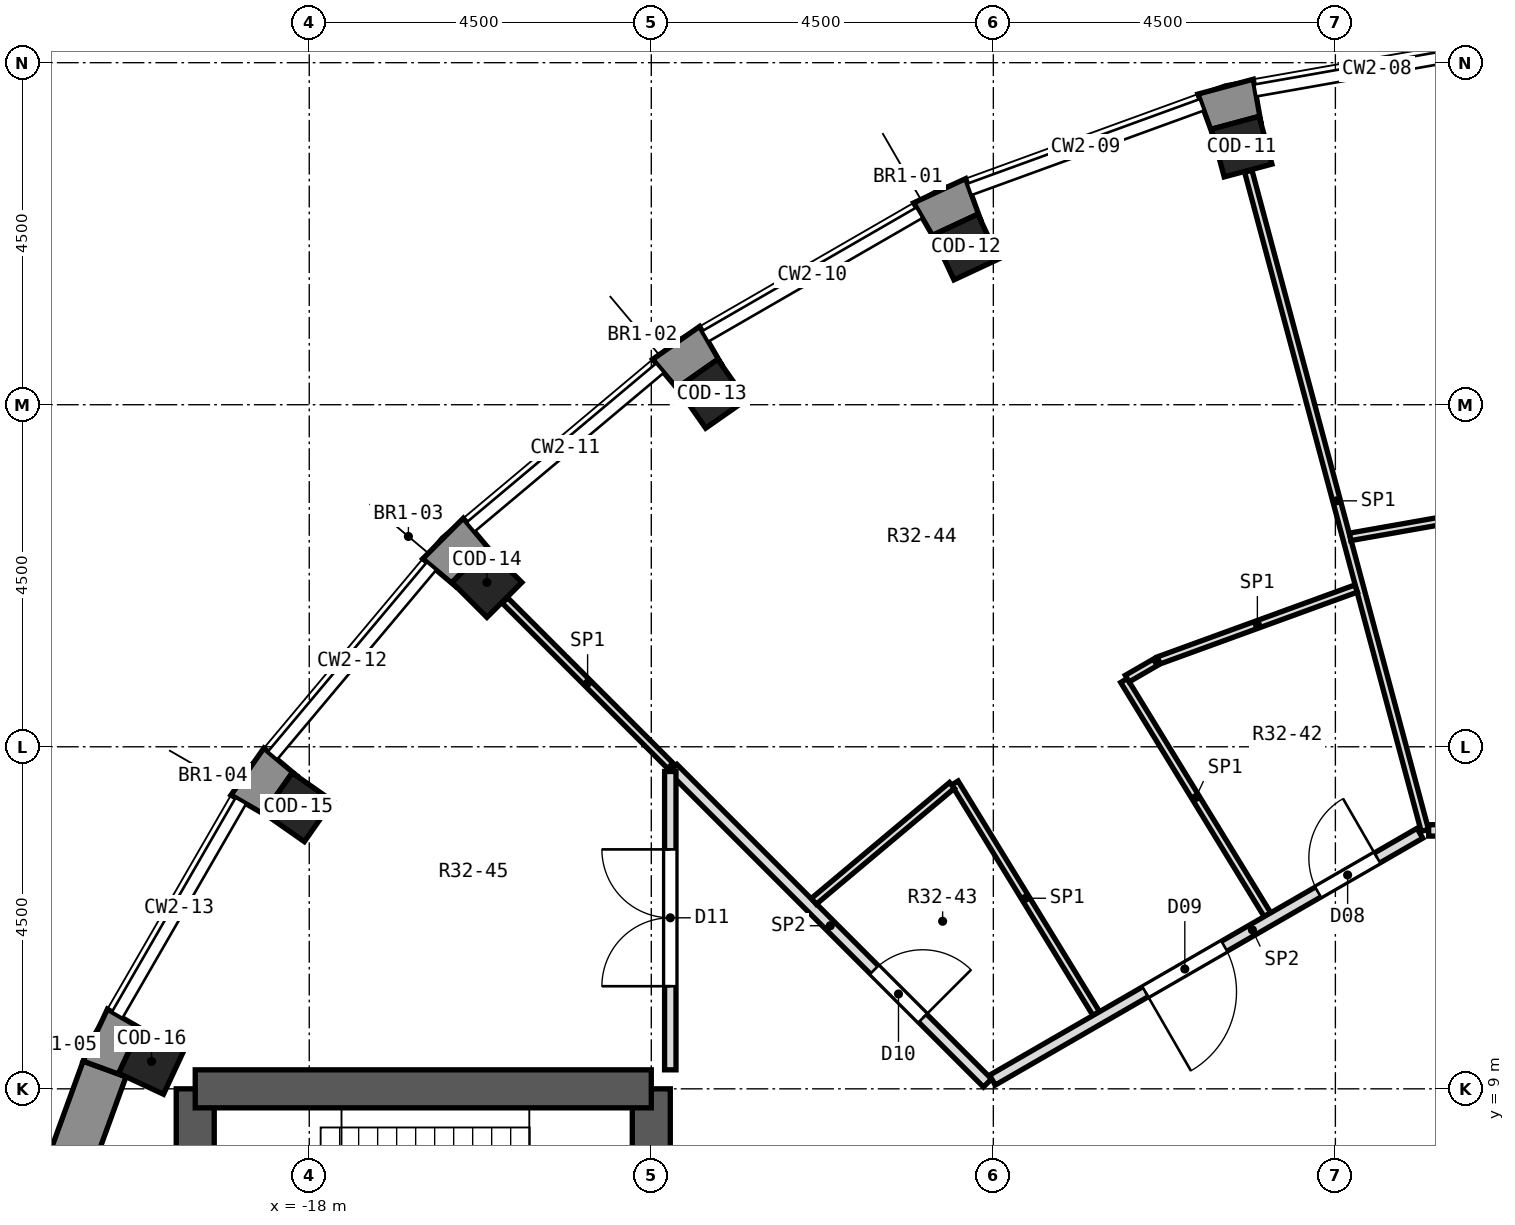
"""IFC4 building model, lengths in metres.
Left out: names, types, materials, properties, quantities, classifications, styles, units other than length and angle.
Written with IfcOpenShell. Run it as: python <this file> out.ifc"""

import sys

from ifc_helpers import new_model, si_unit, direction, frame, frame_2d, origin, origin_2d, place, context, subcontext, project, spatial, polyline, rectangle, outline, extrude, element, fill, save


model = new_model("IFC4")
c1 = context("Model", 3, precision=1e-05, world=origin(), true_north=direction((0.0, 1.0)))
c2 = subcontext(c1, "Body", "Model", "MODEL_VIEW")
j1 = project(units=[si_unit("LENGTHUNIT", "METRE"), si_unit("PLANEANGLEUNIT", "RADIAN")], contexts=[c1])
p1 = place(None, origin())
s1 = spatial("IfcSite", under=j1, at=p1, CompositionType="ELEMENT")
p2 = place(p1, origin())
s2 = spatial("IfcBuilding", under=s1, at=p2, CompositionType="ELEMENT")
p3 = place(p2, frame((0.0, 0.0, 224.7)))
s3 = spatial("IfcBuildingStorey", under=s2, at=p3, CompositionType="ELEMENT", Elevation=224.7)
for number, where, z_axis, x_axis in (
    (1, (-5.733, 21.395, -0.55), (0.0, 0.0, 1.0), (-0.259, 0.966, 0.0)),
    (2, (-9.361, 20.075, -0.55), (0.0, 0.0, 1.0), (-0.423, 0.906, 0.0)),
    (3, (-12.705, 18.144, -0.55), (0.0, 0.0, 1.0), (-0.574, 0.819, 0.0)),
    (4, (-15.662, 15.662, -0.55), (0.0, 0.0, 1.0), (-0.707, 0.707, 0.0)),
    (5, (-18.144, 12.705, -0.55), (0.0, 0.0, 1.0), (-0.819, 0.574, 0.0)),
    (6, (-20.075, 9.361, -0.55), (0.0, 0.0, 1.0), (-0.906, 0.423, 0.0)),
):
    element("IfcColumn", number, at=place(p3, frame(where, z_axis=z_axis, x_axis=x_axis)), inside=s3, PredefinedType="COLUMN", context=c2, shape_type="SweptSolid", body=[
        extrude(rectangle(XDim=0.65, YDim=0.65, at=origin_2d()), origin(), (0.0, 0.0, 1.0), 5.55),
    ])
p4 = place(p3, frame((-13.5, -9.0, 0.0), z_axis=(0.0, 0.0, 1.0), x_axis=(0.0, 1.0, 0.0)))
e7 = element("IfcWall", 7, at=p4, inside=s3, PredefinedType="SHEAR", context=c2, shape_type="SweptSolid", body=[
    extrude(rectangle(XDim=18.0, YDim=0.5, at=frame_2d((9.0, 0.0))), origin(), (0.0, 0.0, 1.0), 5.0),
])
p5 = place(p4, frame((15.4, 0.0, 0.0)))
e8 = element("IfcOpeningElement", 8, at=p5, cuts=e7, PredefinedType="OPENING", context=c2, shape_type="SweptSolid", body=[
    extrude(rectangle(XDim=1.2, YDim=2.1, at=frame_2d((0.6, 1.05))), frame((0.0, 0.262, 0.0), z_axis=(0.0, -1.0, 0.0), x_axis=(1.0, 0.0, 0.0)), (0.0, 0.0, 1.0), 0.524),
])
p6 = place(p4, frame((1.4, 0.0, 0.0)))
e9 = element("IfcOpeningElement", 9, at=p6, cuts=e7, PredefinedType="OPENING", context=c2, shape_type="SweptSolid", body=[
    extrude(rectangle(XDim=1.2, YDim=2.1, at=frame_2d((0.6, 1.05))), frame((0.0, 0.262, 0.0), z_axis=(0.0, -1.0, 0.0), x_axis=(1.0, 0.0, 0.0)), (0.0, 0.0, 1.0), 0.524),
])
p7 = place(p4, frame((7.5, 0.0, 0.0)))
e10 = element("IfcOpeningElement", 10, at=p7, cuts=e7, PredefinedType="OPENING", context=c2, shape_type="SweptSolid", body=[
    extrude(rectangle(XDim=3.0, YDim=2.4, at=frame_2d((1.5, 1.2))), frame((0.0, 0.262, 0.0), z_axis=(0.0, -1.0, 0.0), x_axis=(1.0, 0.0, 0.0)), (0.0, 0.0, 1.0), 0.524),
])
p8 = place(p3, frame((-19.5, -9.0, 0.0), z_axis=(0.0, 0.0, 1.0), x_axis=(0.0, 1.0, 0.0)))
e11 = element("IfcWall", 11, at=p8, inside=s3, PredefinedType="SHEAR", context=c2, shape_type="SweptSolid", body=[
    extrude(rectangle(XDim=18.0, YDim=0.5, at=frame_2d((9.0, 0.0))), origin(), (0.0, 0.0, 1.0), 5.0),
])
p9 = place(p8, frame((9.45, 0.0, 0.0)))
e12 = element("IfcOpeningElement", 12, at=p9, cuts=e11, PredefinedType="OPENING", context=c2, shape_type="SweptSolid", body=[
    extrude(rectangle(XDim=0.9, YDim=2.1, at=frame_2d((0.45, 1.05))), frame((0.0, 0.262, 0.0), z_axis=(0.0, -1.0, 0.0), x_axis=(1.0, 0.0, 0.0)), (0.0, 0.0, 1.0), 0.524),
])
p10 = place(p8, frame((7.65, 0.0, 0.0)))
e13 = element("IfcOpeningElement", 13, at=p10, cuts=e11, PredefinedType="OPENING", context=c2, shape_type="SweptSolid", body=[
    extrude(rectangle(XDim=0.9, YDim=2.1, at=frame_2d((0.45, 1.05))), frame((0.0, 0.262, 0.0), z_axis=(0.0, -1.0, 0.0), x_axis=(1.0, 0.0, 0.0)), (0.0, 0.0, 1.0), 0.524),
])
p11 = place(p3, frame((-13.5, 9.0, 0.0), z_axis=(0.0, 0.0, 1.0), x_axis=(-1.0, 0.0, 0.0)))
e14 = element("IfcWall", 14, at=p11, inside=s3, PredefinedType="SHEAR", context=c2, shape_type="SweptSolid", body=[
    extrude(rectangle(XDim=6.0, YDim=0.5, at=frame_2d((3.0, 0.0))), origin(), (0.0, 0.0, 1.0), 5.0),
])
p12 = place(p3, frame((-20.693, 9.262, 0.0), z_axis=(0.0, 0.0, 1.0), x_axis=(-0.342056509473, -0.939679383794, 0.0)))
e15 = element("IfcWall", 15, at=p12, inside=s3, PredefinedType="SOLIDWALL", context=c2, shape_type="SweptSolid", body=[
    extrude(rectangle(XDim=3.252, YDim=0.6, at=frame_2d((1.626, 0.0))), origin(), (0.0, 0.0, 1.0), 4.6),
])
p13 = place(p3, origin())
e16 = element("IfcWall", 16, at=p13, inside=s3, PredefinedType="SOLIDWALL", context=c2, shape_type="SweptSolid", body=[
    extrude(outline(polyline([(-6.309, 22.087), (-6.104, 21.523), (-6.131, 21.625), (-5.503, 21.793), (-5.476, 21.691), (-5.58, 22.282), (-6.309, 22.087)])), origin(), (0.0, 0.0, 1.0), 4.6),
])
p14 = place(p3, origin())
e17 = element("IfcWall", 17, at=p14, inside=s3, PredefinedType="SOLIDWALL", context=c2, shape_type="SweptSolid", body=[
    extrude(outline(polyline([(-9.364, 20.975), (-10.048, 20.656), (-9.748, 20.136), (-9.793, 20.232), (-9.204, 20.507), (-9.159, 20.411), (-9.364, 20.975)])), origin(), (0.0, 0.0, 1.0), 4.6),
])
p15 = place(p3, origin())
e18 = element("IfcWall", 18, at=p15, inside=s3, PredefinedType="SOLIDWALL", context=c2, shape_type="SweptSolid", body=[
    extrude(outline(polyline([(-12.864, 19.03), (-13.482, 18.597), (-13.097, 18.137), (-13.157, 18.224), (-12.625, 18.597), (-12.564, 18.51), (-12.864, 19.03)])), origin(), (0.0, 0.0, 1.0), 4.6),
])
p16 = place(p3, origin())
e19 = element("IfcWall", 19, at=p16, inside=s3, PredefinedType="SOLIDWALL", context=c2, shape_type="SweptSolid", body=[
    extrude(outline(polyline([(-16.507, 15.973), (-16.047, 15.588), (-16.122, 15.662), (-15.662, 16.122), (-15.588, 16.047), (-15.973, 16.507), (-16.507, 15.973)])), origin(), (0.0, 0.0, 1.0), 4.6),
])
p17 = place(p3, origin())
e20 = element("IfcWall", 20, at=p17, inside=s3, PredefinedType="SOLIDWALL", context=c2, shape_type="SweptSolid", body=[
    extrude(outline(polyline([(-19.03, 12.864), (-18.51, 12.564), (-18.597, 12.625), (-18.224, 13.157), (-18.137, 13.097), (-18.597, 13.482), (-19.03, 12.864)])), origin(), (0.0, 0.0, 1.0), 4.6),
])
p18 = place(p3, origin())
e21 = element("IfcWall", 21, at=p18, inside=s3, PredefinedType="SOLIDWALL", context=c2, shape_type="SweptSolid", body=[
    extrude(outline(polyline([(-20.656, 10.048), (-20.975, 9.364), (-20.411, 9.159), (-20.507, 9.204), (-20.232, 9.793), (-20.136, 9.748), (-20.656, 10.048)])), origin(), (0.0, 0.0, 1.0), 4.6),
])
p19 = place(p3, frame((-5.646, 21.072, 0.0), z_axis=(0.0, 0.0, 1.0), x_axis=(0.258728835498, -0.965949993365, 0.0)))
e22 = element("IfcWall", 22, at=p19, inside=s3, PredefinedType="PARTITIONING", context=c2, shape_type="SweptSolid", body=[
    extrude(rectangle(XDim=8.978, YDim=0.1, at=frame_2d((4.489, 0.0))), origin(), (0.0, 0.0, 1.0), 4.6),
])
p20 = place(p3, frame((-9.506, 13.024, 0.0), z_axis=(0.0, 0.0, 1.0), x_axis=(0.522634449586, -0.852556879103, 0.0)))
e23 = element("IfcWall", 23, at=p20, inside=s3, PredefinedType="PARTITIONING", context=c2, shape_type="SweptSolid", body=[
    extrude(rectangle(XDim=3.559, YDim=0.1, at=frame_2d((1.779, 0.0))), origin(), (0.0, 0.0, 1.0), 4.6),
])
p21 = place(p3, frame((-7.282, 14.372, 0.0), z_axis=(0.0, 0.0, 1.0), x_axis=(0.522422625175, -0.852686695513, 0.0)))
e24 = element("IfcWall", 24, at=p21, inside=s3, PredefinedType="PARTITIONING", context=c2, shape_type="SweptSolid", body=[
    extrude(rectangle(XDim=3.613, YDim=0.1, at=frame_2d((1.807, 0.0))), origin(), (0.0, 0.0, 1.0), 4.6),
])
p22 = place(p3, frame((-15.426, 15.426, 0.0), z_axis=(0.0, 0.0, 1.0), x_axis=(0.707106781187, -0.707106781187, 0.0)))
e25 = element("IfcWall", 25, at=p22, inside=s3, PredefinedType="PARTITIONING", context=c2, shape_type="SweptSolid", body=[
    extrude(rectangle(XDim=3.077, YDim=0.1, at=frame_2d((1.538, 0.0))), origin(), (0.0, 0.0, 1.0), 4.6),
])
p23 = place(p3, frame((-13.215, 13.215, 0.0), z_axis=(0.0, 0.0, 1.0), x_axis=(0.707106781187, -0.707106781187, 0.0)))
e26 = element("IfcWall", 26, at=p23, inside=s3, PredefinedType="PARTITIONING", context=c2, shape_type="SweptSolid", body=[
    extrude(rectangle(XDim=5.852, YDim=0.15, at=frame_2d((2.926, 0.0))), origin(), (0.0, 0.0, 1.0), 4.6),
])
p24 = place(p23, frame((3.746, 0.0, 0.0)))
e27 = element("IfcOpeningElement", 27, at=p24, cuts=e26, PredefinedType="OPENING", context=c2, shape_type="SweptSolid", body=[
    extrude(rectangle(XDim=0.9, YDim=2.1, at=frame_2d((0.45, 1.05))), frame((0.0, 0.087, 0.0), z_axis=(0.0, -1.0, 0.0), x_axis=(1.0, 0.0, 0.0)), (0.0, 0.0, 1.0), 0.174),
])
p25 = place(p3, frame((-3.273, 12.4, 0.0), z_axis=(0.0, 0.0, 1.0), x_axis=(1.0, 0.0, 0.0)))
e28 = element("IfcWall", 28, at=p25, inside=s3, PredefinedType="PARTITIONING", context=c2, shape_type="SweptSolid", body=[
    extrude(rectangle(XDim=6.521, YDim=0.15, at=frame_2d((3.26, 0.0))), origin(), (0.0, 0.0, 1.0), 4.6),
])
p26 = place(p25, frame((5.135, 0.0, 0.0)))
e29 = element("IfcOpeningElement", 29, at=p26, cuts=e28, PredefinedType="OPENING", context=c2, shape_type="SweptSolid", body=[
    extrude(rectangle(XDim=0.9, YDim=2.1, at=frame_2d((0.45, 1.05))), frame((0.0, 0.087, 0.0), z_axis=(0.0, -1.0, 0.0), x_axis=(1.0, 0.0, 0.0)), (0.0, 0.0, 1.0), 0.174),
])
p27 = place(p25, frame((2.673, 0.0, 0.0)))
e30 = element("IfcOpeningElement", 30, at=p27, cuts=e28, PredefinedType="OPENING", context=c2, shape_type="SweptSolid", body=[
    extrude(rectangle(XDim=1.2, YDim=2.1, at=frame_2d((0.6, 1.05))), frame((0.0, 0.087, 0.0), z_axis=(0.0, -1.0, 0.0), x_axis=(1.0, 0.0, 0.0)), (0.0, 0.0, 1.0), 0.174),
])
p28 = place(p25, frame((0.511, 0.0, 0.0)))
e31 = element("IfcOpeningElement", 31, at=p28, cuts=e28, PredefinedType="OPENING", context=c2, shape_type="SweptSolid", body=[
    extrude(rectangle(XDim=0.9, YDim=2.1, at=frame_2d((0.45, 1.05))), frame((0.0, 0.087, 0.0), z_axis=(0.0, -1.0, 0.0), x_axis=(1.0, 0.0, 0.0)), (0.0, 0.0, 1.0), 0.174),
])
p29 = place(p3, frame((-4.306, 16.262, 0.0), z_axis=(0.0, 0.0, 1.0), x_axis=(0.984827012051, 0.17353891879, 0.0)))
e32 = element("IfcWall", 32, at=p29, inside=s3, PredefinedType="PARTITIONING", context=c2, shape_type="SweptSolid", body=[
    extrude(rectangle(XDim=2.883, YDim=0.1, at=frame_2d((1.441, 0.0))), origin(), (0.0, 0.0, 1.0), 4.6),
])
p30 = place(p3, frame((-6.825, 14.636, 0.0), z_axis=(0.0, 0.0, 1.0), x_axis=(0.939664442714, 0.342097552023, 0.0)))
e33 = element("IfcWall", 33, at=p30, inside=s3, PredefinedType="PARTITIONING", context=c2, shape_type="SweptSolid", body=[
    extrude(rectangle(XDim=2.765, YDim=0.1, at=frame_2d((1.382, 0.0))), origin(), (0.0, 0.0, 1.0), 4.6),
])
p31 = place(p3, frame((-9.012, 9.115, 0.0), z_axis=(0.0, 0.0, 1.0), x_axis=(0.865967095912, 0.5001009786, 0.0)))
e34 = element("IfcWall", 34, at=p31, inside=s3, PredefinedType="PARTITIONING", context=c2, shape_type="SweptSolid", body=[
    extrude(rectangle(XDim=6.495, YDim=0.15, at=frame_2d((3.248, 0.0))), origin(), (0.0, 0.0, 1.0), 4.6),
])
p32 = place(p31, frame((4.947, 0.0, 0.0)))
e35 = element("IfcOpeningElement", 35, at=p32, cuts=e34, PredefinedType="OPENING", context=c2, shape_type="SweptSolid", body=[
    extrude(rectangle(XDim=0.9, YDim=2.1, at=frame_2d((0.45, 1.05))), frame((0.0, 0.087, 0.0), z_axis=(0.0, -1.0, 0.0), x_axis=(1.0, 0.0, 0.0)), (0.0, 0.0, 1.0), 0.174),
])
p33 = place(p31, frame((2.323, 0.0, 0.0)))
e36 = element("IfcOpeningElement", 36, at=p33, cuts=e34, PredefinedType="OPENING", context=c2, shape_type="SweptSolid", body=[
    extrude(rectangle(XDim=1.2, YDim=2.1, at=frame_2d((0.6, 1.05))), frame((0.0, 0.087, 0.0), z_axis=(0.0, -1.0, 0.0), x_axis=(1.0, 0.0, 0.0)), (0.0, 0.0, 1.0), 0.174),
])
p34 = place(p3, frame((-7.239, 14.397, 0.0), z_axis=(0.0, 0.0, 1.0), x_axis=(0.865738694872, 0.500496265921, 0.0)))
e37 = element("IfcWall", 37, at=p34, inside=s3, PredefinedType="PARTITIONING", context=c2, shape_type="SweptSolid", body=[
    extrude(rectangle(XDim=0.428, YDim=0.1, at=frame_2d((0.214, 0.0))), origin(), (0.0, 0.0, 1.0), 4.6),
])
p35 = place(p3, frame((-11.362, 11.467, 0.0), z_axis=(0.0, 0.0, 1.0), x_axis=(0.766108172673, 0.642711652115, 0.0)))
e38 = element("IfcWall", 38, at=p35, inside=s3, PredefinedType="PARTITIONING", context=c2, shape_type="SweptSolid", body=[
    extrude(rectangle(XDim=2.372, YDim=0.1, at=frame_2d((1.186, 0.0))), origin(), (0.0, 0.0, 1.0), 4.6),
])
p36 = place(p3, frame((-13.25, 9.25, 0.0), z_axis=(0.0, 0.0, 1.0), x_axis=(0.0, 1.0, 0.0)))
e39 = element("IfcWall", 39, at=p36, inside=s3, PredefinedType="PARTITIONING", context=c2, shape_type="SweptSolid", body=[
    extrude(rectangle(XDim=3.925, YDim=0.15, at=frame_2d((1.962, 0.0))), origin(), (0.0, 0.0, 1.0), 4.6),
])
p37 = place(p36, frame((1.1, 0.0, 0.0)))
e40 = element("IfcOpeningElement", 40, at=p37, cuts=e39, PredefinedType="OPENING", context=c2, shape_type="SweptSolid", body=[
    extrude(rectangle(XDim=1.8, YDim=2.1, at=frame_2d((0.9, 1.05))), frame((0.0, 0.087, 0.0), z_axis=(0.0, -1.0, 0.0), x_axis=(1.0, 0.0, 0.0)), (0.0, 0.0, 1.0), 0.174),
])
p38 = place(p32, origin())
e41 = element("IfcDoor", 41, at=p38, inside=s3, OperationType="SINGLE_SWING_RIGHT", PredefinedType="DOOR", context=c2, shape_type="SweptSolid", body=[
    extrude(rectangle(XDim=0.9, YDim=2.1, at=frame_2d((0.45, 1.05))), frame((0.0, 0.025, 0.0), z_axis=(0.0, -1.0, 0.0), x_axis=(1.0, 0.0, 0.0)), (0.0, 0.0, 1.0), 0.05),
])
fill(e35, e41)
p39 = place(p33, frame((1.2, 0.0, 0.0), z_axis=(0.0, 0.0, 1.0), x_axis=(-1.0, 0.0, 0.0)))
e42 = element("IfcDoor", 42, at=p39, inside=s3, OperationType="SINGLE_SWING_RIGHT", PredefinedType="DOOR", context=c2, shape_type="SweptSolid", body=[
    extrude(rectangle(XDim=1.2, YDim=2.1, at=frame_2d((0.6, 1.05))), frame((0.0, 0.025, 0.0), z_axis=(0.0, -1.0, 0.0), x_axis=(1.0, 0.0, 0.0)), (0.0, 0.0, 1.0), 0.05),
])
fill(e36, e42)
p40 = place(p24, origin())
e43 = element("IfcDoor", 43, at=p40, inside=s3, OperationType="SINGLE_SWING_RIGHT", PredefinedType="DOOR", context=c2, shape_type="SweptSolid", body=[
    extrude(rectangle(XDim=0.9, YDim=2.1, at=frame_2d((0.45, 1.05))), frame((0.0, 0.025, 0.0), z_axis=(0.0, -1.0, 0.0), x_axis=(1.0, 0.0, 0.0)), (0.0, 0.0, 1.0), 0.05),
])
fill(e27, e43)
p41 = place(p37, origin())
e44 = element("IfcDoor", 44, at=p41, inside=s3, OperationType="DOUBLE_DOOR_SINGLE_SWING", PredefinedType="DOOR", context=c2, shape_type="SweptSolid", body=[
    extrude(rectangle(XDim=1.8, YDim=2.1, at=frame_2d((0.9, 1.05))), frame((0.0, 0.025, 0.0), z_axis=(0.0, -1.0, 0.0), x_axis=(1.0, 0.0, 0.0)), (0.0, 0.0, 1.0), 0.05),
])
fill(e40, e44)
save(model, sys.argv[1])
